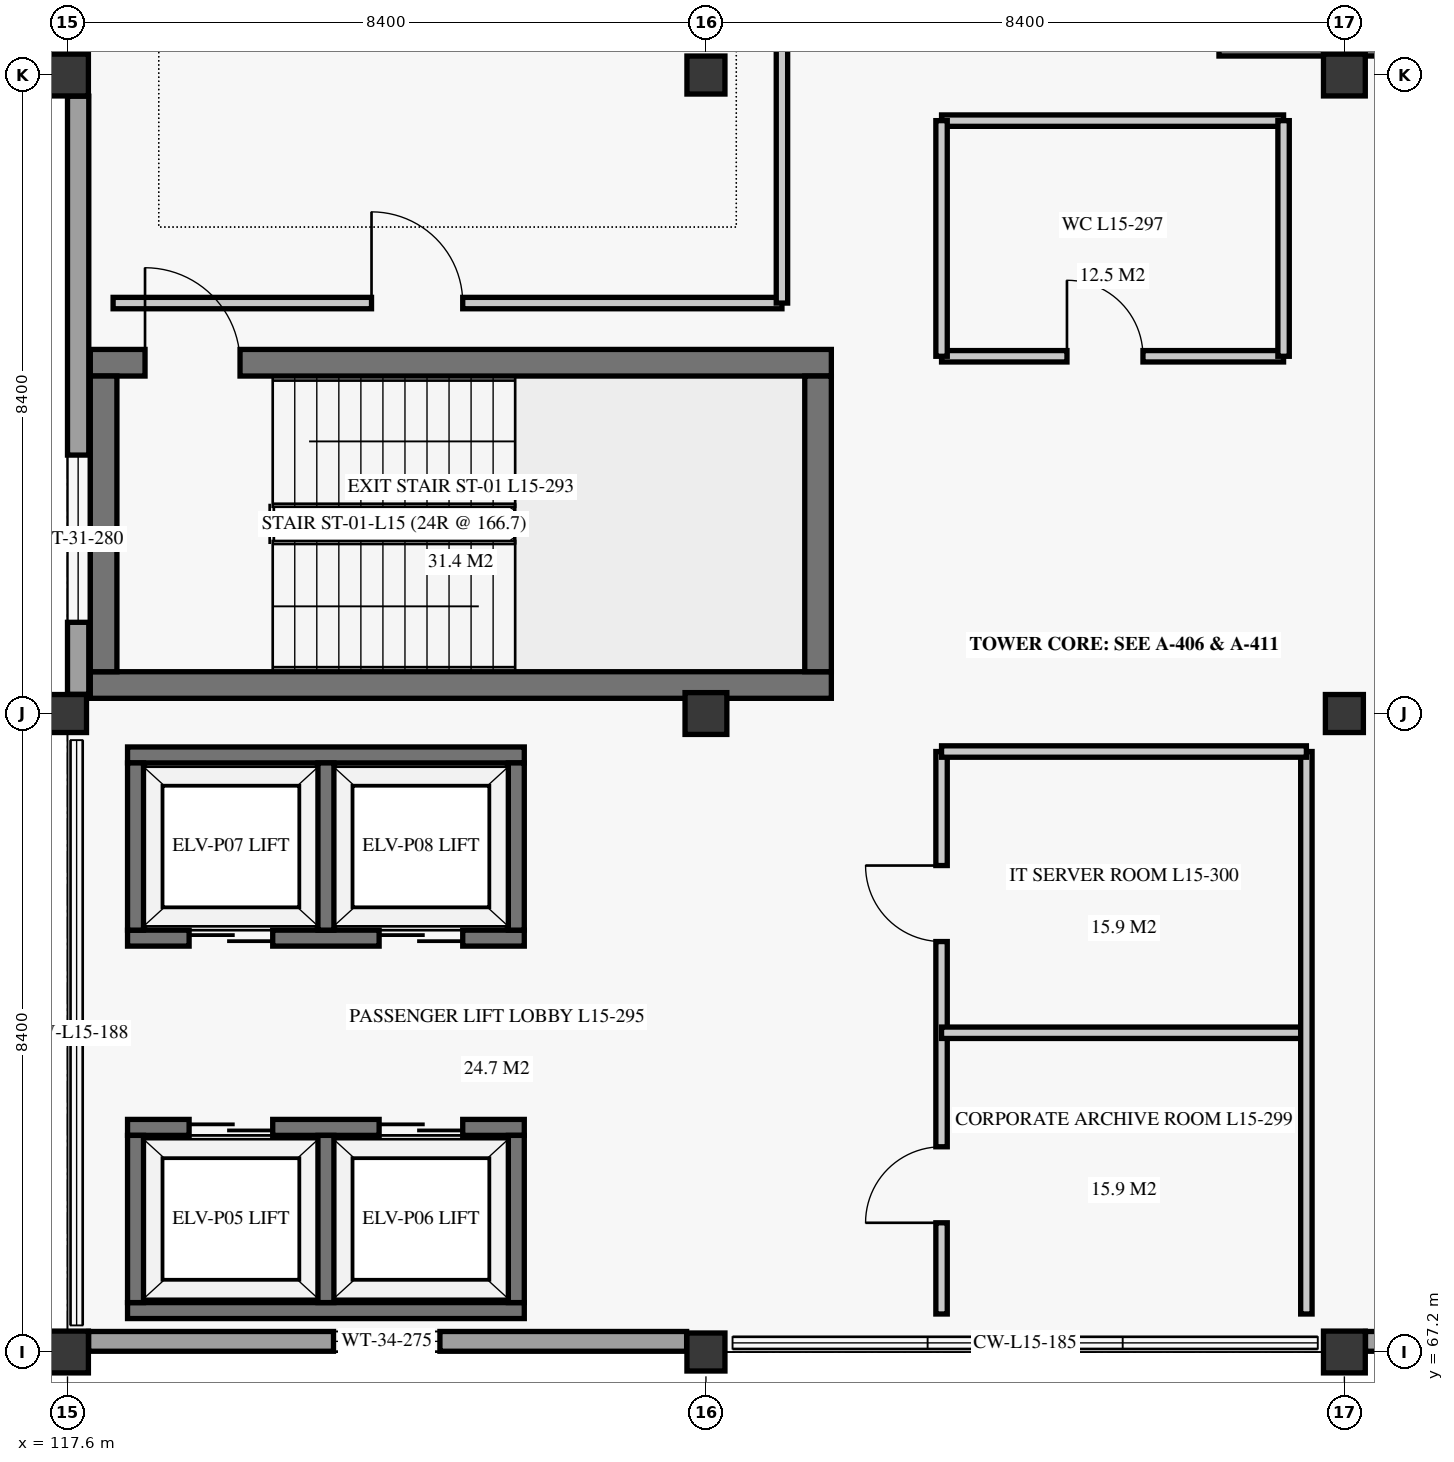
"""IFC4 building model, lengths in metres.
Left out: names, types, materials, properties, quantities, classifications, styles, units other than length and angle.
Written with IfcOpenShell. Run it as: python <this file> out.ifc"""

import sys

from ifc_helpers import new_model, si_unit, direction, frame, frame_2d, origin, origin_2d, place, context, subcontext, project, spatial, rectangle, extrude, element, fill, save


model = new_model("IFC4")
c1 = context("Model", 3, precision=1e-05, world=origin(), true_north=direction((0.0, 1.0)))
c2 = subcontext(c1, "Body", "Model", "MODEL_VIEW")
j1 = project(units=[si_unit("LENGTHUNIT", "METRE"), si_unit("PLANEANGLEUNIT", "RADIAN")], contexts=[c1])
p1 = place(None, origin())
s1 = spatial("IfcSite", under=j1, at=p1, CompositionType="ELEMENT")
p2 = place(p1, origin())
s2 = spatial("IfcBuilding", under=s1, at=p2, CompositionType="ELEMENT")
p3 = place(p2, frame((0.0, 0.0, 62.7)))
s3 = spatial("IfcBuildingStorey", under=s2, at=p3, CompositionType="ELEMENT", Elevation=62.7)
p4 = place(p3, frame((117.6, 67.2, 0.0), z_axis=(0.0, 0.0, 1.0), x_axis=(1.0, 0.0, 0.0)))
e1 = element("IfcColumn", 1, at=p4, inside=s3, PredefinedType="COLUMN", context=c2, shape_type="SweptSolid", body=[
    extrude(rectangle(XDim=0.55, YDim=0.55, at=origin_2d()), origin(), (0.0, 0.0, 1.0), 3.72),
])
p5 = place(p3, frame((117.6, 75.6, 0.0), z_axis=(0.0, 0.0, 1.0), x_axis=(1.0, 0.0, 0.0)))
e2 = element("IfcColumn", 2, at=p5, inside=s3, PredefinedType="COLUMN", context=c2, shape_type="SweptSolid", body=[
    extrude(rectangle(XDim=0.5, YDim=0.5, at=origin_2d()), origin(), (0.0, 0.0, 1.0), 3.72),
])
p6 = place(p3, frame((117.6, 84.0, 0.0), z_axis=(0.0, 0.0, 1.0), x_axis=(1.0, 0.0, 0.0)))
e3 = element("IfcColumn", 3, at=p6, inside=s3, PredefinedType="COLUMN", context=c2, shape_type="SweptSolid", body=[
    extrude(rectangle(XDim=0.55, YDim=0.55, at=origin_2d()), origin(), (0.0, 0.0, 1.0), 3.72),
])
p7 = place(p3, frame((126.0, 67.2, 0.0), z_axis=(0.0, 0.0, 1.0), x_axis=(1.0, 0.0, 0.0)))
e4 = element("IfcColumn", 4, at=p7, inside=s3, PredefinedType="COLUMN", context=c2, shape_type="SweptSolid", body=[
    extrude(rectangle(XDim=0.5, YDim=0.5, at=origin_2d()), origin(), (0.0, 0.0, 1.0), 3.72),
])
p8 = place(p3, frame((126.0, 75.6, 0.0), z_axis=(0.0, 0.0, 1.0), x_axis=(1.0, 0.0, 0.0)))
e5 = element("IfcColumn", 5, at=p8, inside=s3, PredefinedType="COLUMN", context=c2, shape_type="SweptSolid", body=[
    extrude(rectangle(XDim=0.55, YDim=0.55, at=origin_2d()), origin(), (0.0, 0.0, 1.0), 3.72),
])
p9 = place(p3, frame((126.0, 84.0, 0.0), z_axis=(0.0, 0.0, 1.0), x_axis=(1.0, 0.0, 0.0)))
e6 = element("IfcColumn", 6, at=p9, inside=s3, PredefinedType="COLUMN", context=c2, shape_type="SweptSolid", body=[
    extrude(rectangle(XDim=0.5, YDim=0.5, at=origin_2d()), origin(), (0.0, 0.0, 1.0), 3.72),
])
p10 = place(p3, frame((134.4, 67.2, 0.0), z_axis=(0.0, 0.0, 1.0), x_axis=(1.0, 0.0, 0.0)))
e7 = element("IfcColumn", 7, at=p10, inside=s3, PredefinedType="COLUMN", context=c2, shape_type="SweptSolid", body=[
    extrude(rectangle(XDim=0.55, YDim=0.55, at=origin_2d()), origin(), (0.0, 0.0, 1.0), 3.72),
])
p11 = place(p3, frame((134.4, 75.6, 0.0), z_axis=(0.0, 0.0, 1.0), x_axis=(1.0, 0.0, 0.0)))
e8 = element("IfcColumn", 8, at=p11, inside=s3, PredefinedType="COLUMN", context=c2, shape_type="SweptSolid", body=[
    extrude(rectangle(XDim=0.5, YDim=0.5, at=origin_2d()), origin(), (0.0, 0.0, 1.0), 3.72),
])
p12 = place(p3, frame((134.4, 84.0, 0.0), z_axis=(0.0, 0.0, 1.0), x_axis=(1.0, 0.0, 0.0)))
e9 = element("IfcColumn", 9, at=p12, inside=s3, PredefinedType="COLUMN", context=c2, shape_type="SweptSolid", body=[
    extrude(rectangle(XDim=0.55, YDim=0.55, at=origin_2d()), origin(), (0.0, 0.0, 1.0), 3.72),
])
p13 = place(p3, frame((117.878, 67.34, 0.0), z_axis=(0.0, 0.0, 1.0), x_axis=(1.0, 0.0, 0.0)))
e10 = element("IfcWall", 10, at=p13, inside=s3, PredefinedType="SOLIDWALL", context=c2, shape_type="SweptSolid", body=[
    extrude(rectangle(XDim=7.868, YDim=0.26, at=frame_2d((3.934, 0.0))), origin(), (0.0, 0.0, 1.0), 3.04),
])
p14 = place(p13, frame((3.222, 0.0, 0.85)))
e11 = element("IfcOpeningElement", 11, at=p14, cuts=e10, PredefinedType="OPENING", context=c2, shape_type="SweptSolid", body=[
    extrude(rectangle(XDim=1.4, YDim=1.7, at=frame_2d((0.7, 0.85))), frame((0.0, 0.14, 0.0), z_axis=(0.0, -1.0, 0.0), x_axis=(1.0, 0.0, 0.0)), (0.0, 0.0, 1.0), 0.28),
])
p15 = place(p3, frame((134.678, 67.34, 0.0), z_axis=(0.0, 0.0, 1.0), x_axis=(1.0, 0.0, 0.0)))
e12 = element("IfcWall", 12, at=p15, inside=s3, PredefinedType="SOLIDWALL", context=c2, shape_type="SweptSolid", body=[
    extrude(rectangle(XDim=7.87, YDim=0.26, at=frame_2d((3.935, 0.0))), origin(), (0.0, 0.0, 1.0), 3.04),
])
p16 = place(p15, frame((2.672, 0.0, 0.85)))
e13 = element("IfcOpeningElement", 13, at=p16, cuts=e12, PredefinedType="OPENING", context=c2, shape_type="SweptSolid", body=[
    extrude(rectangle(XDim=2.5, YDim=1.8, at=frame_2d((1.25, 0.9))), frame((0.0, 0.14, 0.0), z_axis=(0.0, -1.0, 0.0), x_axis=(1.0, 0.0, 0.0)), (0.0, 0.0, 1.0), 0.28),
])
p17 = place(p3, frame((117.74, 75.852, 0.0), z_axis=(0.0, 0.0, 1.0), x_axis=(0.0, 1.0, 0.0)))
e14 = element("IfcWall", 14, at=p17, inside=s3, PredefinedType="SOLIDWALL", context=c2, shape_type="SweptSolid", body=[
    extrude(rectangle(XDim=7.87, YDim=0.28, at=frame_2d((3.935, 0.0))), origin(), (0.0, 0.0, 1.0), 3.04),
])
p18 = place(p17, frame((0.948, 0.0, 0.85)))
e15 = element("IfcOpeningElement", 15, at=p18, cuts=e14, PredefinedType="OPENING", context=c2, shape_type="SweptSolid", body=[
    extrude(rectangle(XDim=2.2, YDim=1.8, at=frame_2d((1.1, 0.9))), frame((0.0, 0.15, 0.0), z_axis=(0.0, -1.0, 0.0), x_axis=(1.0, 0.0, 0.0)), (0.0, 0.0, 1.0), 0.3),
])
p19 = place(p3, frame((117.9, 75.975, 0.0), z_axis=(0.0, 0.0, 1.0), x_axis=(1.0, 0.0, 0.0)))
e16 = element("IfcWall", 16, at=p19, inside=s3, PredefinedType="SHEAR", context=c2, shape_type="SweptSolid", body=[
    extrude(rectangle(XDim=9.75, YDim=0.35, at=frame_2d((4.875, 0.0))), origin(), (0.0, 0.0, 1.0), 3.72),
])
p20 = place(p3, frame((117.9, 80.215, 0.0), z_axis=(0.0, 0.0, 1.0), x_axis=(1.0, 0.0, 0.0)))
e17 = element("IfcWall", 17, at=p20, inside=s3, PredefinedType="SHEAR", context=c2, shape_type="SweptSolid", body=[
    extrude(rectangle(XDim=9.75, YDim=0.35, at=frame_2d((4.875, 0.0))), origin(), (0.0, 0.0, 1.0), 3.72),
])
p21 = place(p20, frame((0.72, 0.0, 0.0)))
e18 = element("IfcOpeningElement", 18, at=p21, cuts=e17, PredefinedType="OPENING", context=c2, shape_type="SweptSolid", body=[
    extrude(rectangle(XDim=1.25, YDim=2.2, at=frame_2d((0.625, 1.1))), frame((0.0, 0.185, 0.0), z_axis=(0.0, -1.0, 0.0), x_axis=(1.0, 0.0, 0.0)), (0.0, 0.0, 1.0), 0.37),
])
for number, where, z_axis, x_axis in (
    (19, (118.075, 76.15, 0.0), (0.0, 0.0, 1.0), (0.0, 1.0, 0.0)),
    (20, (127.475, 76.15, 0.0), (0.0, 0.0, 1.0), (0.0, 1.0, 0.0)),
):
    element("IfcWall", number, at=place(p3, frame(where, z_axis=z_axis, x_axis=x_axis)), inside=s3, PredefinedType="SHEAR", context=c2, shape_type="SweptSolid", body=[
        extrude(rectangle(XDim=3.89, YDim=0.35, at=frame_2d((1.945, 0.0))), origin(), (0.0, 0.0, 1.0), 3.72),
    ])
p22 = place(p3, frame((132.75, 84.425, 0.0), z_axis=(0.0, 0.0, 1.0), x_axis=(1.0, 0.0, 0.0)))
e21 = element("IfcWall", 21, at=p22, inside=s3, PredefinedType="SHEAR", context=c2, shape_type="SweptSolid", body=[
    extrude(rectangle(XDim=9.75, YDim=0.35, at=frame_2d((4.875, 0.0))), origin(), (0.0, 0.0, 1.0), 3.72),
])
p23 = place(p3, frame((118.39, 67.745, 0.0), z_axis=(0.0, 0.0, 1.0), x_axis=(1.0, 0.0, 0.0)))
e22 = element("IfcWall", 22, at=p23, inside=s3, PredefinedType="SHEAR", context=c2, shape_type="SweptSolid", body=[
    extrude(rectangle(XDim=5.22, YDim=0.21, at=frame_2d((2.61, 0.0))), origin(), (0.0, 0.0, 1.0), 3.72),
])
p24 = place(p3, frame((118.39, 70.155, 0.0), z_axis=(0.0, 0.0, 1.0), x_axis=(1.0, 0.0, 0.0)))
e23 = element("IfcWall", 23, at=p24, inside=s3, PredefinedType="SHEAR", context=c2, shape_type="SweptSolid", body=[
    extrude(rectangle(XDim=5.22, YDim=0.21, at=frame_2d((2.61, 0.0))), origin(), (0.0, 0.0, 1.0), 3.72),
])
p25 = place(p24, frame((0.81, 0.0, 0.0)))
e24 = element("IfcOpeningElement", 24, at=p25, cuts=e23, PredefinedType="OPENING", context=c2, shape_type="SweptSolid", body=[
    extrude(rectangle(XDim=1.1, YDim=2.15, at=frame_2d((0.55, 1.075))), frame((0.0, 0.115, 0.0), z_axis=(0.0, -1.0, 0.0), x_axis=(1.0, 0.0, 0.0)), (0.0, 0.0, 1.0), 0.23),
])
p26 = place(p24, frame((3.31, 0.0, 0.0)))
e25 = element("IfcOpeningElement", 25, at=p26, cuts=e23, PredefinedType="OPENING", context=c2, shape_type="SweptSolid", body=[
    extrude(rectangle(XDim=1.1, YDim=2.15, at=frame_2d((0.55, 1.075))), frame((0.0, 0.115, 0.0), z_axis=(0.0, -1.0, 0.0), x_axis=(1.0, 0.0, 0.0)), (0.0, 0.0, 1.0), 0.23),
])
for number, where, z_axis, x_axis in (
    (26, (118.495, 67.85, 0.0), (0.0, 0.0, 1.0), (0.0, 1.0, 0.0)),
    (27, (123.505, 67.85, 0.0), (0.0, 0.0, 1.0), (0.0, 1.0, 0.0)),
    (28, (121.0, 67.85, 0.0), (0.0, 0.0, 1.0), (0.0, 1.0, 0.0)),
):
    element("IfcWall", number, at=place(p3, frame(where, z_axis=z_axis, x_axis=x_axis)), inside=s3, PredefinedType="SHEAR", context=c2, shape_type="SweptSolid", body=[
        extrude(rectangle(XDim=2.2, YDim=0.21, at=frame_2d((1.1, 0.0))), origin(), (0.0, 0.0, 1.0), 3.72),
    ])
p27 = place(p3, frame((118.39, 72.645, 0.0), z_axis=(0.0, 0.0, 1.0), x_axis=(1.0, 0.0, 0.0)))
e29 = element("IfcWall", 29, at=p27, inside=s3, PredefinedType="SHEAR", context=c2, shape_type="SweptSolid", body=[
    extrude(rectangle(XDim=5.22, YDim=0.21, at=frame_2d((2.61, 0.0))), origin(), (0.0, 0.0, 1.0), 3.72),
])
p28 = place(p27, frame((0.81, 0.0, 0.0)))
e30 = element("IfcOpeningElement", 30, at=p28, cuts=e29, PredefinedType="OPENING", context=c2, shape_type="SweptSolid", body=[
    extrude(rectangle(XDim=1.1, YDim=2.15, at=frame_2d((0.55, 1.075))), frame((0.0, 0.115, 0.0), z_axis=(0.0, -1.0, 0.0), x_axis=(1.0, 0.0, 0.0)), (0.0, 0.0, 1.0), 0.23),
])
p29 = place(p27, frame((3.31, 0.0, 0.0)))
e31 = element("IfcOpeningElement", 31, at=p29, cuts=e29, PredefinedType="OPENING", context=c2, shape_type="SweptSolid", body=[
    extrude(rectangle(XDim=1.1, YDim=2.15, at=frame_2d((0.55, 1.075))), frame((0.0, 0.115, 0.0), z_axis=(0.0, -1.0, 0.0), x_axis=(1.0, 0.0, 0.0)), (0.0, 0.0, 1.0), 0.23),
])
p30 = place(p3, frame((118.39, 75.055, 0.0), z_axis=(0.0, 0.0, 1.0), x_axis=(1.0, 0.0, 0.0)))
e32 = element("IfcWall", 32, at=p30, inside=s3, PredefinedType="SHEAR", context=c2, shape_type="SweptSolid", body=[
    extrude(rectangle(XDim=5.22, YDim=0.21, at=frame_2d((2.61, 0.0))), origin(), (0.0, 0.0, 1.0), 3.72),
])
for number, where, z_axis, x_axis in (
    (33, (118.495, 72.75, 0.0), (0.0, 0.0, 1.0), (0.0, 1.0, 0.0)),
    (34, (123.505, 72.75, 0.0), (0.0, 0.0, 1.0), (0.0, 1.0, 0.0)),
    (35, (121.0, 72.75, 0.0), (0.0, 0.0, 1.0), (0.0, 1.0, 0.0)),
):
    element("IfcWall", number, at=place(p3, frame(where, z_axis=z_axis, x_axis=x_axis)), inside=s3, PredefinedType="SHEAR", context=c2, shape_type="SweptSolid", body=[
        extrude(rectangle(XDim=2.2, YDim=0.21, at=frame_2d((1.1, 0.0))), origin(), (0.0, 0.0, 1.0), 3.72),
    ])
p31 = place(p3, frame((129.1, 80.3, 0.0), z_axis=(0.0, 0.0, 1.0), x_axis=(1.0, 0.0, 0.0)))
e36 = element("IfcWall", 36, at=p31, inside=s3, PredefinedType="PARTITIONING", context=c2, shape_type="SweptSolid", body=[
    extrude(rectangle(XDim=4.5, YDim=0.15, at=frame_2d((2.25, 0.0))), origin(), (0.0, 0.0, 1.0), 3.34),
])
p32 = place(p31, frame((1.65, 0.0, 0.0)))
e37 = element("IfcOpeningElement", 37, at=p32, cuts=e36, PredefinedType="OPENING", context=c2, shape_type="SweptSolid", body=[
    extrude(rectangle(XDim=1.0, YDim=2.1, at=frame_2d((0.5, 1.05))), frame((0.0, 0.085, 0.0), z_axis=(0.0, -1.0, 0.0), x_axis=(1.0, 0.0, 0.0)), (0.0, 0.0, 1.0), 0.17),
])
p33 = place(p3, frame((129.1, 83.4, 0.0), z_axis=(0.0, 0.0, 1.0), x_axis=(1.0, 0.0, 0.0)))
e38 = element("IfcWall", 38, at=p33, inside=s3, PredefinedType="PARTITIONING", context=c2, shape_type="SweptSolid", body=[
    extrude(rectangle(XDim=4.5, YDim=0.15, at=frame_2d((2.25, 0.0))), origin(), (0.0, 0.0, 1.0), 3.34),
])
for number, where, z_axis, x_axis in (
    (39, (129.1, 80.3, 0.0), (0.0, 0.0, 1.0), (0.0, 1.0, 0.0)),
    (40, (133.6, 80.3, 0.0), (0.0, 0.0, 1.0), (0.0, 1.0, 0.0)),
):
    element("IfcWall", number, at=place(p3, frame(where, z_axis=z_axis, x_axis=x_axis)), inside=s3, PredefinedType="PARTITIONING", context=c2, shape_type="SweptSolid", body=[
        extrude(rectangle(XDim=3.1, YDim=0.15, at=frame_2d((1.55, 0.0))), origin(), (0.0, 0.0, 1.0), 3.34),
    ])
p34 = place(p3, frame((129.1, 67.7, 0.0), z_axis=(0.0, 0.0, 1.0), x_axis=(0.0, 1.0, 0.0)))
e41 = element("IfcWall", 41, at=p34, inside=s3, PredefinedType="PARTITIONING", context=c2, shape_type="SweptSolid", body=[
    extrude(rectangle(XDim=7.4, YDim=0.15, at=frame_2d((3.7, 0.0))), origin(), (0.0, 0.0, 1.0), 3.34),
])
p35 = place(p34, frame((1.2, 0.0, 0.0)))
e42 = element("IfcOpeningElement", 42, at=p35, cuts=e41, PredefinedType="OPENING", context=c2, shape_type="SweptSolid", body=[
    extrude(rectangle(XDim=1.0, YDim=2.1, at=frame_2d((0.5, 1.05))), frame((0.0, 0.085, 0.0), z_axis=(0.0, -1.0, 0.0), x_axis=(1.0, 0.0, 0.0)), (0.0, 0.0, 1.0), 0.17),
])
p36 = place(p34, frame((4.9, 0.0, 0.0)))
e43 = element("IfcOpeningElement", 43, at=p36, cuts=e41, PredefinedType="OPENING", context=c2, shape_type="SweptSolid", body=[
    extrude(rectangle(XDim=1.0, YDim=2.1, at=frame_2d((0.5, 1.05))), frame((0.0, 0.085, 0.0), z_axis=(0.0, -1.0, 0.0), x_axis=(1.0, 0.0, 0.0)), (0.0, 0.0, 1.0), 0.17),
])
p37 = place(p3, frame((129.1, 71.4, 0.0), z_axis=(0.0, 0.0, 1.0), x_axis=(1.0, 0.0, 0.0)))
e44 = element("IfcWall", 44, at=p37, inside=s3, PredefinedType="PARTITIONING", context=c2, shape_type="SweptSolid", body=[
    extrude(rectangle(XDim=4.8, YDim=0.15, at=frame_2d((2.4, 0.0))), origin(), (0.0, 0.0, 1.0), 3.34),
])
p38 = place(p3, frame((133.9, 67.7, 0.0), z_axis=(0.0, 0.0, 1.0), x_axis=(0.0, 1.0, 0.0)))
e45 = element("IfcWall", 45, at=p38, inside=s3, PredefinedType="PARTITIONING", context=c2, shape_type="SweptSolid", body=[
    extrude(rectangle(XDim=7.4, YDim=0.15, at=frame_2d((3.7, 0.0))), origin(), (0.0, 0.0, 1.0), 3.34),
])
p39 = place(p3, frame((129.1, 75.1, 0.0), z_axis=(0.0, 0.0, 1.0), x_axis=(1.0, 0.0, 0.0)))
e46 = element("IfcWall", 46, at=p39, inside=s3, PredefinedType="PARTITIONING", context=c2, shape_type="SweptSolid", body=[
    extrude(rectangle(XDim=4.8, YDim=0.15, at=frame_2d((2.4, 0.0))), origin(), (0.0, 0.0, 1.0), 3.34),
])
p40 = place(p3, frame((118.2, 81.0, 0.0), z_axis=(0.0, 0.0, 1.0), x_axis=(1.0, 0.0, 0.0)))
e47 = element("IfcWall", 47, at=p40, inside=s3, PredefinedType="PARTITIONING", context=c2, shape_type="SweptSolid", body=[
    extrude(rectangle(XDim=8.8, YDim=0.15, at=frame_2d((4.4, 0.0))), origin(), (0.0, 0.0, 1.0), 3.34),
])
p41 = place(p40, frame((3.4, 0.0, 0.0)))
e48 = element("IfcOpeningElement", 48, at=p41, cuts=e47, PredefinedType="OPENING", context=c2, shape_type="SweptSolid", body=[
    extrude(rectangle(XDim=1.2, YDim=2.3, at=frame_2d((0.6, 1.15))), frame((0.0, 0.085, 0.0), z_axis=(0.0, -1.0, 0.0), x_axis=(1.0, 0.0, 0.0)), (0.0, 0.0, 1.0), 0.17),
])
p42 = place(p3, frame((127.0, 81.0, 0.0), z_axis=(0.0, 0.0, 1.0), x_axis=(0.0, 1.0, 0.0)))
e49 = element("IfcWall", 49, at=p42, inside=s3, PredefinedType="PARTITIONING", context=c2, shape_type="SweptSolid", body=[
    extrude(rectangle(XDim=11.0, YDim=0.15, at=frame_2d((5.5, 0.0))), origin(), (0.0, 0.0, 1.0), 3.34),
])
p43 = place(p14, origin())
e50 = element("IfcWindow", 50, at=p43, inside=s3, PartitioningType="SINGLE_PANEL", PredefinedType="WINDOW", context=c2, shape_type="SweptSolid", body=[
    extrude(rectangle(XDim=1.4, YDim=1.7, at=frame_2d((0.7, 0.85))), frame((0.0, 0.03, 0.0), z_axis=(0.0, -1.0, 0.0), x_axis=(1.0, 0.0, 0.0)), (0.0, 0.0, 1.0), 0.06),
])
fill(e11, e50)
p44 = place(p18, origin())
e51 = element("IfcWindow", 51, at=p44, inside=s3, PartitioningType="SINGLE_PANEL", PredefinedType="WINDOW", context=c2, shape_type="SweptSolid", body=[
    extrude(rectangle(XDim=2.2, YDim=1.8, at=frame_2d((1.1, 0.9))), frame((0.0, 0.03, 0.0), z_axis=(0.0, -1.0, 0.0), x_axis=(1.0, 0.0, 0.0)), (0.0, 0.0, 1.0), 0.06),
])
fill(e15, e51)
p45 = place(p21, origin())
e52 = element("IfcDoor", 52, at=p45, inside=s3, OperationType="SINGLE_SWING_LEFT", PredefinedType="DOOR", context=c2, shape_type="SweptSolid", body=[
    extrude(rectangle(XDim=1.25, YDim=2.2, at=frame_2d((0.625, 1.1))), frame((0.0, 0.025, 0.0), z_axis=(0.0, -1.0, 0.0), x_axis=(1.0, 0.0, 0.0)), (0.0, 0.0, 1.0), 0.05),
])
fill(e18, e52)
p46 = place(p25, origin())
e53 = element("IfcDoor", 53, at=p46, inside=s3, OperationType="DOUBLE_DOOR_SLIDING", PredefinedType="DOOR", context=c2, shape_type="SweptSolid", body=[
    extrude(rectangle(XDim=1.1, YDim=2.15, at=frame_2d((0.55, 1.075))), frame((0.0, 0.025, 0.0), z_axis=(0.0, -1.0, 0.0), x_axis=(1.0, 0.0, 0.0)), (0.0, 0.0, 1.0), 0.05),
])
fill(e24, e53)
p47 = place(p26, origin())
e54 = element("IfcDoor", 54, at=p47, inside=s3, OperationType="DOUBLE_DOOR_SLIDING", PredefinedType="DOOR", context=c2, shape_type="SweptSolid", body=[
    extrude(rectangle(XDim=1.1, YDim=2.15, at=frame_2d((0.55, 1.075))), frame((0.0, 0.025, 0.0), z_axis=(0.0, -1.0, 0.0), x_axis=(1.0, 0.0, 0.0)), (0.0, 0.0, 1.0), 0.05),
])
fill(e25, e54)
p48 = place(p28, origin())
e55 = element("IfcDoor", 55, at=p48, inside=s3, OperationType="DOUBLE_DOOR_SLIDING", PredefinedType="DOOR", context=c2, shape_type="SweptSolid", body=[
    extrude(rectangle(XDim=1.1, YDim=2.15, at=frame_2d((0.55, 1.075))), frame((0.0, 0.025, 0.0), z_axis=(0.0, -1.0, 0.0), x_axis=(1.0, 0.0, 0.0)), (0.0, 0.0, 1.0), 0.05),
])
fill(e30, e55)
p49 = place(p29, origin())
e56 = element("IfcDoor", 56, at=p49, inside=s3, OperationType="DOUBLE_DOOR_SLIDING", PredefinedType="DOOR", context=c2, shape_type="SweptSolid", body=[
    extrude(rectangle(XDim=1.1, YDim=2.15, at=frame_2d((0.55, 1.075))), frame((0.0, 0.025, 0.0), z_axis=(0.0, -1.0, 0.0), x_axis=(1.0, 0.0, 0.0)), (0.0, 0.0, 1.0), 0.05),
])
fill(e31, e56)
p50 = place(p32, origin())
e57 = element("IfcDoor", 57, at=p50, inside=s3, OperationType="SINGLE_SWING_LEFT", PredefinedType="DOOR", context=c2, shape_type="SweptSolid", body=[
    extrude(rectangle(XDim=1.0, YDim=2.1, at=frame_2d((0.5, 1.05))), frame((0.0, 0.025, 0.0), z_axis=(0.0, -1.0, 0.0), x_axis=(1.0, 0.0, 0.0)), (0.0, 0.0, 1.0), 0.05),
])
fill(e37, e57)
p51 = place(p35, origin())
e58 = element("IfcDoor", 58, at=p51, inside=s3, OperationType="SINGLE_SWING_LEFT", PredefinedType="DOOR", context=c2, shape_type="SweptSolid", body=[
    extrude(rectangle(XDim=1.0, YDim=2.1, at=frame_2d((0.5, 1.05))), frame((0.0, 0.025, 0.0), z_axis=(0.0, -1.0, 0.0), x_axis=(1.0, 0.0, 0.0)), (0.0, 0.0, 1.0), 0.05),
])
fill(e42, e58)
p52 = place(p36, origin())
e59 = element("IfcDoor", 59, at=p52, inside=s3, OperationType="SINGLE_SWING_RIGHT", PredefinedType="DOOR", context=c2, shape_type="SweptSolid", body=[
    extrude(rectangle(XDim=1.0, YDim=2.1, at=frame_2d((0.5, 1.05))), frame((0.0, 0.025, 0.0), z_axis=(0.0, -1.0, 0.0), x_axis=(1.0, 0.0, 0.0)), (0.0, 0.0, 1.0), 0.05),
])
fill(e43, e59)
p53 = place(p41, origin())
e60 = element("IfcDoor", 60, at=p53, inside=s3, OperationType="SINGLE_SWING_LEFT", PredefinedType="DOOR", context=c2, shape_type="SweptSolid", body=[
    extrude(rectangle(XDim=1.2, YDim=2.3, at=frame_2d((0.6, 1.15))), frame((0.0, 0.025, 0.0), z_axis=(0.0, -1.0, 0.0), x_axis=(1.0, 0.0, 0.0)), (0.0, 0.0, 1.0), 0.05),
])
fill(e48, e60)
save(model, sys.argv[1])
